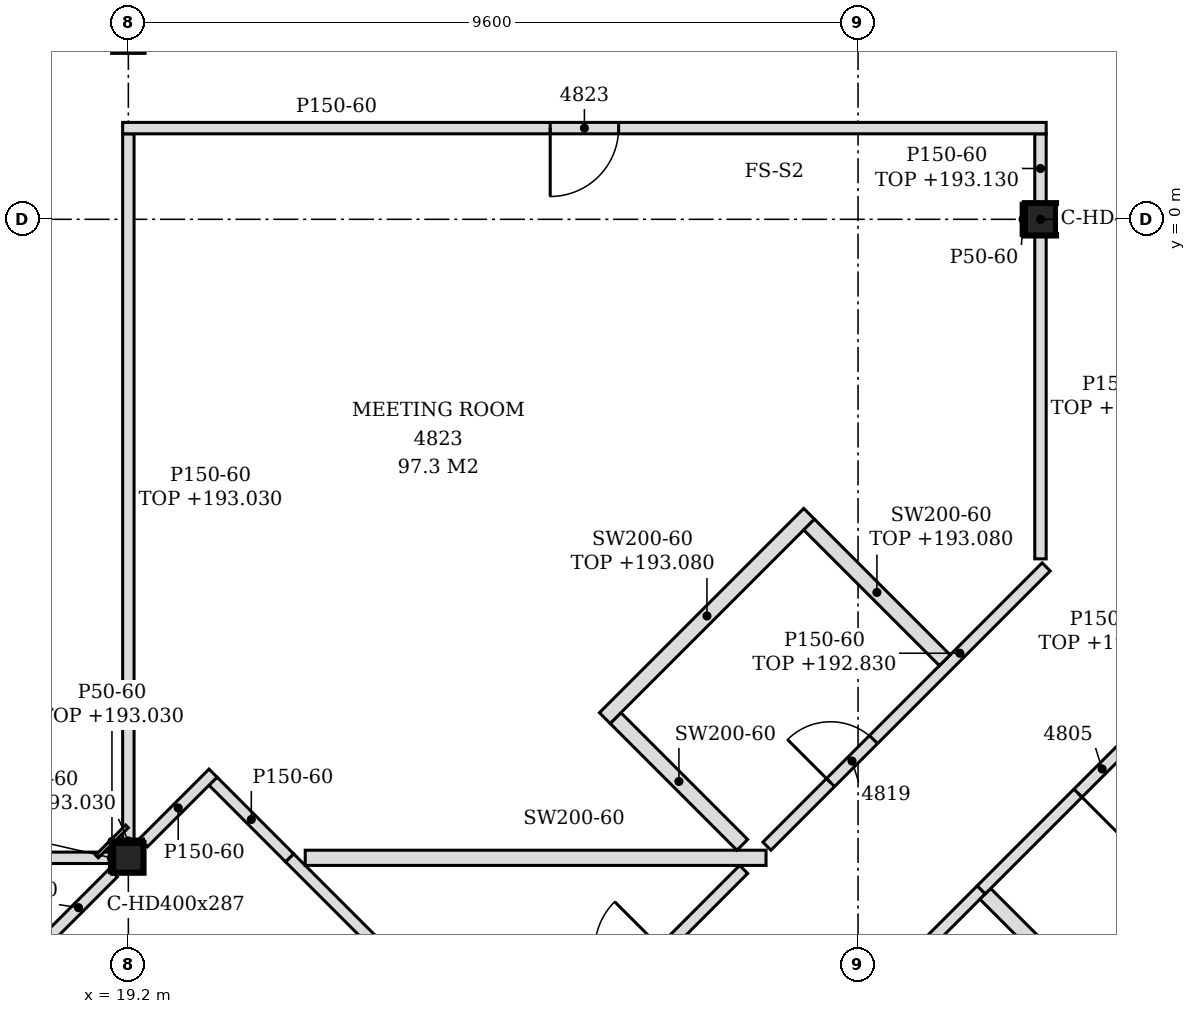
"""IFC4 building model, lengths in metres.
Left out: names, types, materials, properties, quantities, classifications, styles, units other than length and angle.
Written with IfcOpenShell. Run it as: python <this file> out.ifc"""

import sys

from ifc_helpers import new_model, si_unit, direction, frame, frame_2d, origin, origin_2d, place, context, subcontext, project, spatial, polyline, rectangle, i_section, outline, extrude, element, fill, save


model = new_model("IFC4")
c1 = context("Model", 3, precision=1e-05, world=origin(), true_north=direction((0.0, 1.0)))
c2 = subcontext(c1, "Body", "Model", "MODEL_VIEW")
j1 = project(units=[si_unit("LENGTHUNIT", "METRE"), si_unit("PLANEANGLEUNIT", "RADIAN")], contexts=[c1])
p1 = place(None, origin())
s1 = spatial("IfcSite", under=j1, at=p1, CompositionType="ELEMENT")
p2 = place(p1, origin())
s2 = spatial("IfcBuilding", under=s1, at=p2, CompositionType="ELEMENT")
p3 = place(p2, frame((0.0, 0.0, 190.2)))
s3 = spatial("IfcBuildingStorey", under=s2, at=p3, CompositionType="ELEMENT", Elevation=190.2)
p4 = place(p3, frame((19.2, -8.4, -0.15), z_axis=(0.0, 0.0, 1.0), x_axis=(1.0, 0.0, 0.0)))
e1 = element("IfcColumn", 1, at=p4, inside=s3, PredefinedType="COLUMN", context=c2, shape_type="SweptSolid", body=[
    extrude(i_section(OverallWidth=0.399, OverallDepth=0.393, WebThickness=0.023, FlangeThickness=0.037, FilletRadius=0.015, at=origin_2d()), origin(), (0.0, 0.0, 1.0), 3.6),
])
p5 = place(p3, frame((31.2, 0.0, -0.15), z_axis=(0.0, 0.0, 1.0), x_axis=(1.0, 0.0, 0.0)))
e2 = element("IfcColumn", 2, at=p5, inside=s3, PredefinedType="COLUMN", context=c2, shape_type="SweptSolid", body=[
    extrude(i_section(OverallWidth=0.409, OverallDepth=0.425, WebThickness=0.033, FlangeThickness=0.052, FilletRadius=0.015, at=origin_2d()), origin(), (0.0, 0.0, 1.0), 3.6),
])
p6 = place(p3, frame((24.424, -14.818, 0.0), z_axis=(0.0, 0.0, 1.0), x_axis=(0.707106781187, 0.707106781187, 0.0)))
e3 = element("IfcWall", 3, at=p6, inside=s3, PredefinedType="PARTITIONING", context=c2, shape_type="SweptSolid", body=[
    extrude(rectangle(XDim=8.481, YDim=0.15, at=frame_2d((4.241, 0.0))), origin(), (0.0, 0.0, 1.0), 2.88),
])
p7 = place(p6, frame((1.085, 0.0, 0.0)))
e4 = element("IfcOpeningElement", 4, at=p7, cuts=e3, PredefinedType="OPENING", context=c2, shape_type="SweptSolid", body=[
    extrude(rectangle(XDim=0.9, YDim=2.1, at=frame_2d((0.45, 1.05))), frame((0.0, 0.085, 0.0), z_axis=(0.0, -1.0, 0.0), x_axis=(1.0, 0.0, 0.0)), (0.0, 0.0, 1.0), 0.17),
])
p8 = place(p6, frame((5.375, 0.0, 0.0)))
e5 = element("IfcOpeningElement", 5, at=p8, cuts=e3, PredefinedType="OPENING", context=c2, shape_type="SweptSolid", body=[
    extrude(rectangle(XDim=0.9, YDim=2.1, at=frame_2d((0.45, 1.05))), frame((0.0, 0.085, 0.0), z_axis=(0.0, -1.0, 0.0), x_axis=(1.0, 0.0, 0.0)), (0.0, 0.0, 1.0), 0.17),
])
p9 = place(p3, frame((35.293, -13.693, 0.0), z_axis=(0.0, 0.0, 1.0), x_axis=(-0.70708887, 0.707124691919, 0.0)))
e6 = element("IfcWall", 6, at=p9, inside=s3, PredefinedType="PARTITIONING", context=c2, shape_type="SweptSolid", body=[
    extrude(rectangle(XDim=6.815, YDim=0.2, at=frame_2d((3.408, 0.0))), origin(), (0.0, 0.0, 1.0), 2.63),
])
p10 = place(p3, frame((24.332, -11.517, 0.0), z_axis=(0.0, 0.0, 1.0), x_axis=(0.706961133128, 0.707252399251, 0.0)))
e7 = element("IfcWall", 7, at=p10, inside=s3, PredefinedType="PARTITIONING", context=c2, shape_type="SweptSolid", body=[
    extrude(rectangle(XDim=4.191, YDim=0.15, at=frame_2d((2.095, 0.0))), origin(), (0.0, 0.0, 1.0), 2.88),
])
p11 = place(p10, frame((1.791, 0.0, 0.0)))
e8 = element("IfcOpeningElement", 8, at=p11, cuts=e7, PredefinedType="OPENING", context=c2, shape_type="SweptSolid", body=[
    extrude(rectangle(XDim=0.9, YDim=2.1, at=frame_2d((0.45, 1.05))), frame((0.0, 0.085, 0.0), z_axis=(0.0, -1.0, 0.0), x_axis=(1.0, 0.0, 0.0)), (0.0, 0.0, 1.0), 0.17),
])
p12 = place(p3, frame((24.332, -11.411, 0.0), z_axis=(0.0, 0.0, 1.0), x_axis=(-0.707106781187, 0.707106781187, 0.0)))
e9 = element("IfcWall", 9, at=p12, inside=s3, PredefinedType="PARTITIONING", context=c2, shape_type="SweptSolid", body=[
    extrude(rectangle(XDim=4.258, YDim=0.15, at=frame_2d((2.129, 0.0))), origin(), (0.0, 0.0, 1.0), 2.88),
])
p13 = place(p3, frame((18.086, -9.514, 0.0), z_axis=(0.0, 0.0, 1.0), x_axis=(0.707106781187, 0.707106781187, 0.0)))
e10 = element("IfcWall", 10, at=p13, inside=s3, PredefinedType="PARTITIONING", context=c2, shape_type="SweptSolid", body=[
    extrude(rectangle(XDim=1.295, YDim=0.15, at=frame_2d((0.648, 0.0))), origin(), (0.0, 0.0, 1.0), 3.45),
])
p14 = place(p3, frame((30.421, -8.821, 0.0), z_axis=(0.0, 0.0, 1.0), x_axis=(0.70724246319, 0.706971073143, 0.0)))
e11 = element("IfcWall", 11, at=p14, inside=s3, PredefinedType="PARTITIONING", context=c2, shape_type="SweptSolid", body=[
    extrude(rectangle(XDim=4.498, YDim=0.15, at=frame_2d((2.249, 0.0))), origin(), (0.0, 0.0, 1.0), 2.63),
])
p15 = place(p14, frame((1.799, 0.0, 0.0)))
e12 = element("IfcOpeningElement", 12, at=p15, cuts=e11, PredefinedType="OPENING", context=c2, shape_type="SweptSolid", body=[
    extrude(rectangle(XDim=0.9, YDim=2.1, at=frame_2d((0.45, 1.05))), frame((0.0, 0.085, 0.0), z_axis=(0.0, -1.0, 0.0), x_axis=(1.0, 0.0, 0.0)), (0.0, 0.0, 1.0), 0.17),
])
p16 = place(p3, frame((7.399, -8.4, 0.0), z_axis=(0.0, 0.0, 1.0), x_axis=(1.0, 0.0, 0.0)))
e13 = element("IfcWall", 13, at=p16, inside=s3, PredefinedType="PARTITIONING", context=c2, shape_type="SweptSolid", body=[
    extrude(rectangle(XDim=11.601, YDim=0.15, at=frame_2d((5.801, 0.0))), origin(), (0.0, 0.0, 1.0), 2.83),
])
p17 = place(p3, frame((21.321, -8.4, 0.0), z_axis=(0.0, 0.0, 1.0), x_axis=(-0.706763941595, 0.707449454633, 0.0)))
e14 = element("IfcWall", 14, at=p17, inside=s3, PredefinedType="PARTITIONING", context=c2, shape_type="SweptSolid", body=[
    extrude(rectangle(XDim=1.425, YDim=0.15, at=frame_2d((0.712, 0.0))), origin(), (0.0, 0.0, 1.0), 3.45),
])
p18 = place(p3, frame((21.527, -8.4, 0.0), z_axis=(0.0, 0.0, 1.0), x_axis=(1.0, 0.0, 0.0)))
e15 = element("IfcWall", 15, at=p18, inside=s3, PredefinedType="PARTITIONING", context=c2, shape_type="SweptSolid", body=[
    extrude(rectangle(XDim=6.062, YDim=0.2, at=frame_2d((3.031, 0.0))), origin(), (0.0, 0.0, 1.0), 3.45),
])
p19 = place(p3, frame((19.2, -8.204, 0.0), z_axis=(0.0, 0.0, 1.0), x_axis=(0.0, 1.0, 0.0)))
e16 = element("IfcWall", 16, at=p19, inside=s3, PredefinedType="PARTITIONING", context=c2, shape_type="SweptSolid", body=[
    extrude(rectangle(XDim=9.329, YDim=0.15, at=frame_2d((4.664, 0.0))), origin(), (0.0, 0.0, 1.0), 2.83),
])
p20 = place(p3, frame((19.398, -8.202, 0.0), z_axis=(0.0, 0.0, 1.0), x_axis=(0.707200993001, 0.707012556818, 0.0)))
e17 = element("IfcWall", 17, at=p20, inside=s3, PredefinedType="PARTITIONING", context=c2, shape_type="SweptSolid", body=[
    extrude(rectangle(XDim=1.296, YDim=0.15, at=frame_2d((0.648, 0.0))), origin(), (0.0, 0.0, 1.0), 3.45),
])
p21 = place(p3, frame((27.277, -8.229, 0.0), z_axis=(0.0, 0.0, 1.0), x_axis=(-0.707158540274, 0.70705501831, 0.0)))
e18 = element("IfcWall", 18, at=p21, inside=s3, PredefinedType="PARTITIONING", context=c2, shape_type="SweptSolid", body=[
    extrude(rectangle(XDim=2.358, YDim=0.2, at=frame_2d((1.179, 0.0))), origin(), (0.0, 0.0, 1.0), 3.45),
])
p22 = place(p3, frame((27.601, -8.247, 0.0), z_axis=(0.0, 0.0, 1.0), x_axis=(0.707083286535, 0.707130275057, 0.0)))
e19 = element("IfcWall", 19, at=p22, inside=s3, PredefinedType="PARTITIONING", context=c2, shape_type="SweptSolid", body=[
    extrude(rectangle(XDim=5.196, YDim=0.15, at=frame_2d((2.598, 0.0))), origin(), (0.0, 0.0, 1.0), 2.63),
])
p23 = place(p22, frame((1.184, 0.0, 0.0)))
e20 = element("IfcOpeningElement", 20, at=p23, cuts=e19, PredefinedType="OPENING", context=c2, shape_type="SweptSolid", body=[
    extrude(rectangle(XDim=0.8, YDim=2.1, at=frame_2d((0.4, 1.05))), frame((0.0, 0.085, 0.0), z_axis=(0.0, -1.0, 0.0), x_axis=(1.0, 0.0, 0.0)), (0.0, 0.0, 1.0), 0.17),
])
p24 = place(p3, frame((25.468, -6.562, 0.0), z_axis=(0.0, 0.0, 1.0), x_axis=(0.707106781187, 0.707106781187, 0.0)))
e21 = element("IfcWall", 21, at=p24, inside=s3, PredefinedType="PARTITIONING", context=c2, shape_type="SweptSolid", body=[
    extrude(rectangle(XDim=3.801, YDim=0.2, at=frame_2d((1.9, 0.0))), origin(), (0.0, 0.0, 1.0), 2.88),
])
p25 = place(p3, frame((29.941, -5.801, 0.0), z_axis=(0.0, 0.0, 1.0), x_axis=(-0.707058430352, 0.707155128715, 0.0)))
e22 = element("IfcWall", 22, at=p25, inside=s3, PredefinedType="PARTITIONING", context=c2, shape_type="SweptSolid", body=[
    extrude(rectangle(XDim=2.525, YDim=0.2, at=frame_2d((1.262, 0.0))), origin(), (0.0, 0.0, 1.0), 2.88),
])
p26 = place(p3, frame((31.2, -4.467, 0.0), z_axis=(0.0, 0.0, 1.0), x_axis=(0.0, 1.0, 0.0)))
e23 = element("IfcWall", 23, at=p26, inside=s3, PredefinedType="PARTITIONING", context=c2, shape_type="SweptSolid", body=[
    extrude(rectangle(XDim=4.254, YDim=0.15, at=frame_2d((2.127, 0.0))), origin(), (0.0, 0.0, 1.0), 2.63),
])
p27 = place(p3, frame((31.2, 0.212, 0.0), z_axis=(0.0, 0.0, 1.0), x_axis=(0.0, 1.0, 0.0)))
e24 = element("IfcWall", 24, at=p27, inside=s3, PredefinedType="PARTITIONING", context=c2, shape_type="SweptSolid", body=[
    extrude(rectangle(XDim=0.913, YDim=0.15, at=frame_2d((0.456, 0.0))), origin(), (0.0, 0.0, 1.0), 2.93),
])
p28 = place(p3, frame((19.125, 1.2, 0.0), z_axis=(0.0, 0.0, 1.0), x_axis=(1.0, 0.0, 0.0)))
e25 = element("IfcWall", 25, at=p28, inside=s3, PredefinedType="PARTITIONING", context=c2, shape_type="SweptSolid", body=[
    extrude(outline(polyline([(0.0, 0.0), (12.15, 0.0), (12.15, 2.93), (11.925, 2.93), (11.923, 3.45), (0.225, 3.45), (0.223, 2.83), (0.0, 2.83), (0.0, 0.0)])), frame((0.0, 0.075, 0.0), z_axis=(0.0, -1.0, 0.0), x_axis=(1.0, 0.0, 0.0)), (0.0, 0.0, 1.0), 0.15),
])
p29 = place(p28, frame((5.625, 0.0, 0.0)))
e26 = element("IfcOpeningElement", 26, at=p29, cuts=e25, PredefinedType="OPENING", context=c2, shape_type="SweptSolid", body=[
    extrude(rectangle(XDim=0.9, YDim=2.1, at=frame_2d((0.45, 1.05))), frame((0.0, 0.085, 0.0), z_axis=(0.0, -1.0, 0.0), x_axis=(1.0, 0.0, 0.0)), (0.0, 0.0, 1.0), 0.17),
])
p30 = place(p3, frame((18.786, -8.382, 0.0), z_axis=(0.0, 0.0, 1.0), x_axis=(0.707106781187, 0.707106781187, 0.0)))
e27 = element("IfcWall", 27, at=p30, inside=s3, PredefinedType="PARTITIONING", context=c2, shape_type="SweptSolid", body=[
    extrude(rectangle(XDim=0.56, YDim=0.05, at=frame_2d((0.28, 0.0))), origin(), (0.0, 0.0, 1.0), 2.83),
])
p31 = place(p3, frame((19.0, -8.178, 0.0), z_axis=(0.0, 0.0, 1.0), x_axis=(1.0, 0.0, 0.0)))
e28 = element("IfcWall", 28, at=p31, inside=s3, PredefinedType="PARTITIONING", context=c2, shape_type="SweptSolid", body=[
    extrude(rectangle(XDim=0.399, YDim=0.05, at=frame_2d((0.199, 0.0))), origin(), (0.0, 0.0, 1.0), 2.83),
])
p32 = place(p3, frame((18.976, -8.596, 0.0), z_axis=(0.0, 0.0, 1.0), x_axis=(0.0, 1.0, 0.0)))
e29 = element("IfcWall", 29, at=p32, inside=s3, PredefinedType="PARTITIONING", context=c2, shape_type="SweptSolid", body=[
    extrude(rectangle(XDim=0.393, YDim=0.05, at=frame_2d((0.196, 0.0))), origin(), (0.0, 0.0, 1.0), 2.83),
])
p33 = place(p3, frame((30.97, -0.212, 0.0), z_axis=(0.0, 0.0, 1.0), x_axis=(0.0, 1.0, 0.0)))
e30 = element("IfcWall", 30, at=p33, inside=s3, PredefinedType="PARTITIONING", context=c2, shape_type="SweptSolid", body=[
    extrude(rectangle(XDim=0.425, YDim=0.05, at=frame_2d((0.212, 0.0))), origin(), (0.0, 0.0, 1.0), 3.45),
])
p34 = place(p15, frame((0.9, 0.0, 0.0), z_axis=(0.0, 0.0, 1.0), x_axis=(-1.0, 0.0, 0.0)))
e31 = element("IfcDoor", 31, at=p34, inside=s3, OperationType="SINGLE_SWING_RIGHT", PredefinedType="DOOR", context=c2, shape_type="SweptSolid", body=[
    extrude(rectangle(XDim=0.9, YDim=2.1, at=frame_2d((0.45, 1.05))), frame((0.0, 0.025, 0.0), z_axis=(0.0, -1.0, 0.0), x_axis=(1.0, 0.0, 0.0)), (0.0, 0.0, 1.0), 0.05),
])
fill(e12, e31)
p35 = place(p23, origin())
e32 = element("IfcDoor", 32, at=p35, inside=s3, OperationType="SINGLE_SWING_LEFT", PredefinedType="DOOR", context=c2, shape_type="SweptSolid", body=[
    extrude(rectangle(XDim=0.8, YDim=2.1, at=frame_2d((0.4, 1.05))), frame((0.0, 0.025, 0.0), z_axis=(0.0, -1.0, 0.0), x_axis=(1.0, 0.0, 0.0)), (0.0, 0.0, 1.0), 0.05),
])
fill(e20, e32)
p36 = place(p29, frame((0.9, 0.0, 0.0), z_axis=(0.0, 0.0, 1.0), x_axis=(-1.0, 0.0, 0.0)))
e33 = element("IfcDoor", 33, at=p36, inside=s3, OperationType="SINGLE_SWING_RIGHT", PredefinedType="DOOR", context=c2, shape_type="SweptSolid", body=[
    extrude(rectangle(XDim=0.9, YDim=2.1, at=frame_2d((0.45, 1.05))), frame((0.0, 0.025, 0.0), z_axis=(0.0, -1.0, 0.0), x_axis=(1.0, 0.0, 0.0)), (0.0, 0.0, 1.0), 0.05),
])
fill(e26, e33)
save(model, sys.argv[1])
